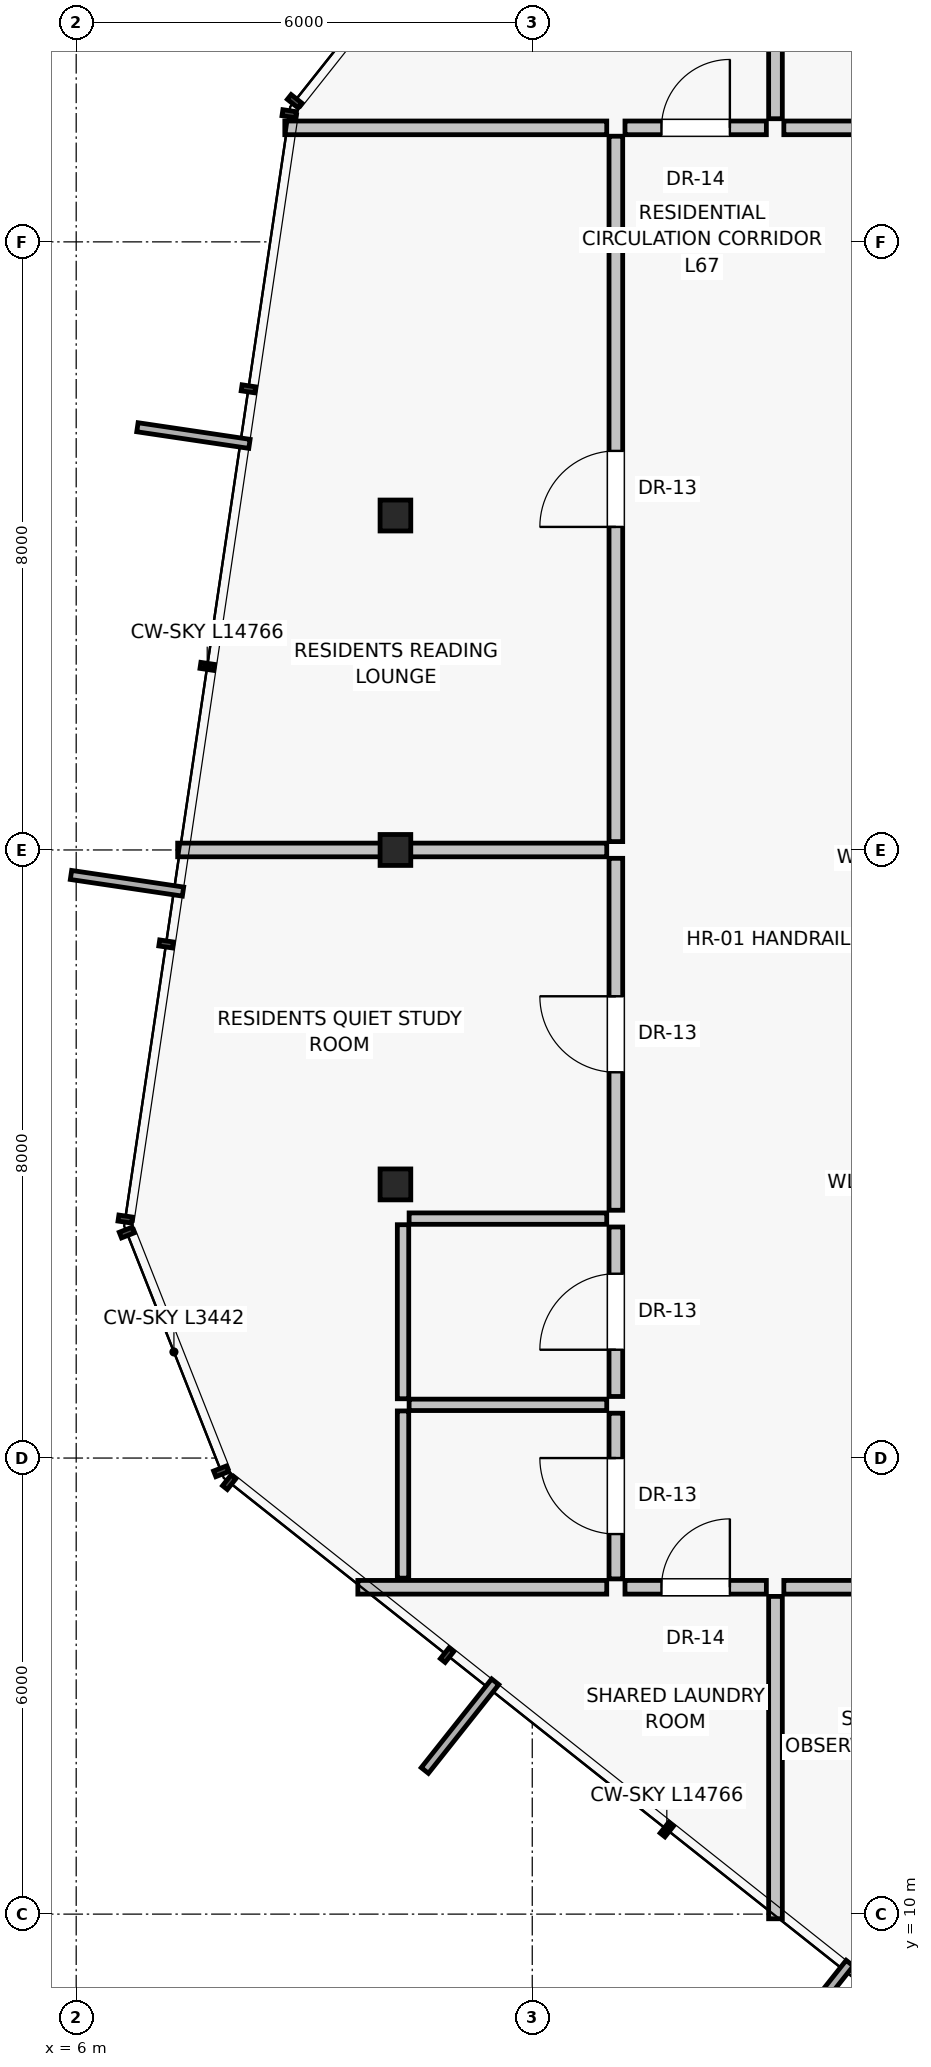
"""IFC4 building model, lengths in metres.
Left out: names, types, materials, properties, quantities, classifications, styles, units other than length and angle.
Written with IfcOpenShell. Run it as: python <this file> out.ifc"""

import sys

from ifc_helpers import new_model, si_unit, direction, frame, frame_2d, origin, origin_2d, place, context, subcontext, project, spatial, rectangle, i_section, extrude, source, transform, mapped, element, fill, save


model = new_model("IFC4")
c1 = context("Model", 3, precision=1e-05, world=origin(), true_north=direction((0.0, 1.0)))
c2 = subcontext(c1, "Body", "Model", "MODEL_VIEW")
j1 = project(units=[si_unit("LENGTHUNIT", "METRE"), si_unit("PLANEANGLEUNIT", "RADIAN")], contexts=[c1])
p1 = place(None, origin())
s1 = spatial("IfcSite", under=j1, at=p1, CompositionType="ELEMENT")
p2 = place(p1, origin())
s2 = spatial("IfcBuilding", under=s1, at=p2, CompositionType="ELEMENT")
p3 = place(p2, frame((0.0, 0.0, 236.55)))
s3 = spatial("IfcBuildingStorey", under=s2, at=p3, CompositionType="ELEMENT", Elevation=236.55)
for number, where, z_axis, x_axis in (
    (1, (10.2, 28.4, 0.0), (0.0, 0.0, 1.0), (1.0, 0.0, 0.0)),
    (2, (10.2, 24.0, 0.0), (0.0, 0.0, 1.0), (1.0, 0.0, 0.0)),
    (3, (10.2, 19.6, 0.0), (0.0, 0.0, 1.0), (1.0, 0.0, 0.0)),
):
    element("IfcColumn", number, at=place(p3, frame(where, z_axis=z_axis, x_axis=x_axis)), inside=s3, PredefinedType="COLUMN", context=c2, shape_type="SweptSolid", body=[
        extrude(i_section(OverallWidth=0.404, OverallDepth=0.407, WebThickness=0.025, FlangeThickness=0.04, at=origin_2d()), origin(), (0.0, 0.0, 1.0), 4.1),
    ])
p4 = place(p3, frame((15.2, 14.18, 0.0), z_axis=(0.0, 0.0, 1.0), x_axis=(0.0, -1.0, 0.0)))
e4 = element("IfcWall", 4, at=p4, inside=s3, PredefinedType="PARTITIONING", context=c2, shape_type="SweptSolid", body=[
    extrude(rectangle(XDim=4.241, YDim=0.18, at=frame_2d((2.121, 0.0))), origin(), (0.0, 0.0, 1.0), 3.865),
])
p5 = place(p3, frame((15.31, 14.3, 0.0), z_axis=(0.0, 0.0, 1.0), x_axis=(1.0, 0.0, 0.0)))
e5 = element("IfcWall", 5, at=p5, inside=s3, PredefinedType="PARTITIONING", context=c2, shape_type="SweptSolid", body=[
    extrude(rectangle(XDim=8.9, YDim=0.18, at=frame_2d((4.45, 0.0))), origin(), (0.0, 0.0, 1.0), 3.865),
])
p6 = place(p5, frame((3.55, 0.0, 0.0)))
e6 = element("IfcOpeningElement", 6, at=p6, cuts=e5, PredefinedType="OPENING", context=c2, shape_type="SweptSolid", body=[
    extrude(rectangle(XDim=1.8, YDim=2.25, at=frame_2d((0.9, 1.125))), frame((0.0, 0.1, 0.0), z_axis=(0.0, -1.0, 0.0), x_axis=(1.0, 0.0, 0.0)), (0.0, 0.0, 1.0), 0.2),
])
p7 = place(p3, frame((15.2, 33.62, 0.0), z_axis=(0.0, 0.0, 1.0), x_axis=(0.0, 1.0, 0.0)))
e7 = element("IfcWall", 7, at=p7, inside=s3, PredefinedType="PARTITIONING", context=c2, shape_type="SweptSolid", body=[
    extrude(rectangle(XDim=4.627, YDim=0.18, at=frame_2d((2.314, 0.0))), origin(), (0.0, 0.0, 1.0), 3.865),
])
p8 = place(p3, frame((15.31, 33.5, 0.0), z_axis=(0.0, 0.0, 1.0), x_axis=(1.0, 0.0, 0.0)))
e8 = element("IfcWall", 8, at=p8, inside=s3, PredefinedType="PARTITIONING", context=c2, shape_type="SweptSolid", body=[
    extrude(rectangle(XDim=5.95, YDim=0.18, at=frame_2d((2.975, 0.0))), origin(), (0.0, 0.0, 1.0), 3.865),
])
p9 = place(p8, frame((3.604, 0.0, 0.0)))
e9 = element("IfcOpeningElement", 9, at=p9, cuts=e8, PredefinedType="OPENING", context=c2, shape_type="SweptSolid", body=[
    extrude(rectangle(XDim=0.95, YDim=2.02, at=frame_2d((0.475, 1.01))), frame((0.0, 0.1, 0.0), z_axis=(0.0, -1.0, 0.0), x_axis=(1.0, 0.0, 0.0)), (0.0, 0.0, 1.0), 0.2),
])
p10 = place(p3, frame((12.98, 14.3, 0.0), z_axis=(0.0, 0.0, 1.0), x_axis=(-1.0, 0.0, 0.0)))
e10 = element("IfcWall", 10, at=p10, inside=s3, PredefinedType="PARTITIONING", context=c2, shape_type="SweptSolid", body=[
    extrude(rectangle(XDim=3.274, YDim=0.18, at=frame_2d((1.637, 0.0))), origin(), (0.0, 0.0, 1.0), 3.865),
])
p11 = place(p3, frame((12.98, 33.5, 0.0), z_axis=(0.0, 0.0, 1.0), x_axis=(-1.0, 0.0, 0.0)))
e11 = element("IfcWall", 11, at=p11, inside=s3, PredefinedType="PARTITIONING", context=c2, shape_type="SweptSolid", body=[
    extrude(rectangle(XDim=4.235, YDim=0.18, at=frame_2d((2.118, 0.0))), origin(), (0.0, 0.0, 1.0), 3.865),
])
p12 = place(p3, frame((13.1, 14.41, 0.0), z_axis=(0.0, 0.0, 1.0), x_axis=(0.0, 1.0, 0.0)))
e12 = element("IfcWall", 12, at=p12, inside=s3, PredefinedType="PARTITIONING", context=c2, shape_type="SweptSolid", body=[
    extrude(rectangle(XDim=2.18, YDim=0.18, at=frame_2d((1.09, 0.0))), origin(), (0.0, 0.0, 1.0), 3.865),
])
p13 = place(p12, frame((0.59, 0.0, 0.0)))
e13 = element("IfcOpeningElement", 13, at=p13, cuts=e12, PredefinedType="OPENING", context=c2, shape_type="SweptSolid", body=[
    extrude(rectangle(XDim=1.0, YDim=2.01, at=frame_2d((0.5, 1.005))), frame((0.0, 0.1, 0.0), z_axis=(0.0, -1.0, 0.0), x_axis=(1.0, 0.0, 0.0)), (0.0, 0.0, 1.0), 0.2),
])
p14 = place(p3, frame((13.1, 16.81, 0.0), z_axis=(0.0, 0.0, 1.0), x_axis=(0.0, 1.0, 0.0)))
e14 = element("IfcWall", 14, at=p14, inside=s3, PredefinedType="PARTITIONING", context=c2, shape_type="SweptSolid", body=[
    extrude(rectangle(XDim=2.23, YDim=0.18, at=frame_2d((1.115, 0.0))), origin(), (0.0, 0.0, 1.0), 3.512),
])
p15 = place(p14, frame((0.615, 0.0, 0.0)))
e15 = element("IfcOpeningElement", 15, at=p15, cuts=e14, PredefinedType="OPENING", context=c2, shape_type="SweptSolid", body=[
    extrude(rectangle(XDim=1.0, YDim=2.01, at=frame_2d((0.5, 1.005))), frame((0.0, 0.1, 0.0), z_axis=(0.0, -1.0, 0.0), x_axis=(1.0, 0.0, 0.0)), (0.0, 0.0, 1.0), 0.2),
])
p16 = place(p3, frame((13.1, 19.26, 0.0), z_axis=(0.0, 0.0, 1.0), x_axis=(0.0, 1.0, 0.0)))
e16 = element("IfcWall", 16, at=p16, inside=s3, PredefinedType="PARTITIONING", context=c2, shape_type="SweptSolid", body=[
    extrude(rectangle(XDim=4.63, YDim=0.18, at=frame_2d((2.315, 0.0))), origin(), (0.0, 0.0, 1.0), 3.512),
])
p17 = place(p16, frame((1.815, 0.0, 0.0)))
e17 = element("IfcOpeningElement", 17, at=p17, cuts=e16, PredefinedType="OPENING", context=c2, shape_type="SweptSolid", body=[
    extrude(rectangle(XDim=1.0, YDim=2.01, at=frame_2d((0.5, 1.005))), frame((0.0, 0.1, 0.0), z_axis=(0.0, -1.0, 0.0), x_axis=(1.0, 0.0, 0.0)), (0.0, 0.0, 1.0), 0.2),
])
p18 = place(p3, frame((13.1, 24.11, 0.0), z_axis=(0.0, 0.0, 1.0), x_axis=(0.0, 1.0, 0.0)))
e18 = element("IfcWall", 18, at=p18, inside=s3, PredefinedType="PARTITIONING", context=c2, shape_type="SweptSolid", body=[
    extrude(rectangle(XDim=9.28, YDim=0.18, at=frame_2d((4.64, 0.0))), origin(), (0.0, 0.0, 1.0), 3.512),
])
p19 = place(p18, frame((4.14, 0.0, 0.0)))
e19 = element("IfcOpeningElement", 19, at=p19, cuts=e18, PredefinedType="OPENING", context=c2, shape_type="SweptSolid", body=[
    extrude(rectangle(XDim=1.0, YDim=2.01, at=frame_2d((0.5, 1.005))), frame((0.0, 0.1, 0.0), z_axis=(0.0, -1.0, 0.0), x_axis=(1.0, 0.0, 0.0)), (0.0, 0.0, 1.0), 0.2),
])
for number, where, z_axis, x_axis in (
    (20, (12.98, 16.7, 0.0), (0.0, 0.0, 1.0), (-1.0, 0.0, 0.0)),
    (21, (12.98, 19.15, 0.0), (0.0, 0.0, 1.0), (-1.0, 0.0, 0.0)),
):
    element("IfcWall", number, at=place(p3, frame(where, z_axis=z_axis, x_axis=x_axis)), inside=s3, PredefinedType="PARTITIONING", context=c2, shape_type="SweptSolid", body=[
        extrude(rectangle(XDim=2.6, YDim=0.15, at=frame_2d((1.3, 0.0))), origin(), (0.0, 0.0, 1.0), 3.865),
    ])
p20 = place(p3, frame((10.3, 14.42, 0.0), z_axis=(0.0, 0.0, 1.0), x_axis=(0.0, 1.0, 0.0)))
e22 = element("IfcWall", 22, at=p20, inside=s3, PredefinedType="PARTITIONING", context=c2, shape_type="SweptSolid", body=[
    extrude(rectangle(XDim=2.2, YDim=0.15, at=frame_2d((1.1, 0.0))), origin(), (0.0, 0.0, 1.0), 3.865),
])
p21 = place(p3, frame((10.3, 16.78, 0.0), z_axis=(0.0, 0.0, 1.0), x_axis=(0.0, 1.0, 0.0)))
e23 = element("IfcWall", 23, at=p21, inside=s3, PredefinedType="PARTITIONING", context=c2, shape_type="SweptSolid", body=[
    extrude(rectangle(XDim=2.29, YDim=0.15, at=frame_2d((1.145, 0.0))), origin(), (0.0, 0.0, 1.0), 3.865),
])
p22 = place(p3, frame((12.98, 24.0, 0.0), z_axis=(0.0, 0.0, 1.0), x_axis=(-1.0, 0.0, 0.0)))
e24 = element("IfcWall", 24, at=p22, inside=s3, PredefinedType="PARTITIONING", context=c2, shape_type="SweptSolid", body=[
    extrude(rectangle(XDim=5.645, YDim=0.18, at=frame_2d((2.822, 0.0))), origin(), (0.0, 0.0, 1.0), 3.865),
])
p23 = place(p3, frame((13.22, 14.3, 0.0), z_axis=(0.0, 0.0, 1.0), x_axis=(1.0, 0.0, 0.0)))
e25 = element("IfcWall", 25, at=p23, inside=s3, PredefinedType="PARTITIONING", context=c2, shape_type="SweptSolid", body=[
    extrude(rectangle(XDim=1.86, YDim=0.18, at=frame_2d((0.93, 0.0))), origin(), (0.0, 0.0, 1.0), 3.865),
])
p24 = place(p23, frame((0.48, 0.0, 0.0)))
e26 = element("IfcOpeningElement", 26, at=p24, cuts=e25, PredefinedType="OPENING", context=c2, shape_type="SweptSolid", body=[
    extrude(rectangle(XDim=0.9, YDim=2.01, at=frame_2d((0.45, 1.005))), frame((0.0, 0.1, 0.0), z_axis=(0.0, -1.0, 0.0), x_axis=(1.0, 0.0, 0.0)), (0.0, 0.0, 1.0), 0.2),
])
p25 = place(p3, frame((13.22, 33.5, 0.0), z_axis=(0.0, 0.0, 1.0), x_axis=(1.0, 0.0, 0.0)))
e27 = element("IfcWall", 27, at=p25, inside=s3, PredefinedType="PARTITIONING", context=c2, shape_type="SweptSolid", body=[
    extrude(rectangle(XDim=1.86, YDim=0.18, at=frame_2d((0.93, 0.0))), origin(), (0.0, 0.0, 1.0), 3.865),
])
p26 = place(p25, frame((0.48, 0.0, 0.0)))
e28 = element("IfcOpeningElement", 28, at=p26, cuts=e27, PredefinedType="OPENING", context=c2, shape_type="SweptSolid", body=[
    extrude(rectangle(XDim=0.9, YDim=2.01, at=frame_2d((0.45, 1.005))), frame((0.0, 0.1, 0.0), z_axis=(0.0, -1.0, 0.0), x_axis=(1.0, 0.0, 0.0)), (0.0, 0.0, 1.0), 0.2),
])
m1 = source(origin(), c2, "Body", "SweptSolid", [
    extrude(rectangle(XDim=1.0, YDim=2.01, at=frame_2d((0.5, 1.005))), frame((0.0, 0.025, 0.0), z_axis=(0.0, -1.0, 0.0), x_axis=(1.0, 0.0, 0.0)), (0.0, 0.0, 1.0), 0.05),
])
p27 = place(p13, origin())
e29 = element("IfcDoor", 29, at=p27, inside=s3, OperationType="SINGLE_SWING_RIGHT", PredefinedType="DOOR", context=c2, shape_type="MappedRepresentation", body=[
    mapped(m1, transform((0.0, 0.0, 0.0), scale=1.0)),
])
fill(e13, e29)
p28 = place(p15, origin())
e30 = element("IfcDoor", 30, at=p28, inside=s3, OperationType="SINGLE_SWING_LEFT", PredefinedType="DOOR", context=c2, shape_type="MappedRepresentation", body=[
    mapped(m1, transform((0.0, 0.0, 0.0), scale=1.0)),
])
fill(e15, e30)
p29 = place(p17, origin())
e31 = element("IfcDoor", 31, at=p29, inside=s3, OperationType="SINGLE_SWING_RIGHT", PredefinedType="DOOR", context=c2, shape_type="MappedRepresentation", body=[
    mapped(m1, transform((0.0, 0.0, 0.0), scale=1.0)),
])
fill(e17, e31)
p30 = place(p19, origin())
e32 = element("IfcDoor", 32, at=p30, inside=s3, OperationType="SINGLE_SWING_LEFT", PredefinedType="DOOR", context=c2, shape_type="MappedRepresentation", body=[
    mapped(m1, transform((0.0, 0.0, 0.0), scale=1.0)),
])
fill(e19, e32)
m2 = source(origin(), c2, "Body", "SweptSolid", [
    extrude(rectangle(XDim=0.9, YDim=2.01, at=frame_2d((0.45, 1.005))), frame((0.0, 0.025, 0.0), z_axis=(0.0, -1.0, 0.0), x_axis=(1.0, 0.0, 0.0)), (0.0, 0.0, 1.0), 0.05),
])
p31 = place(p24, origin())
e33 = element("IfcDoor", 33, at=p31, inside=s3, OperationType="SINGLE_SWING_RIGHT", PredefinedType="DOOR", context=c2, shape_type="MappedRepresentation", body=[
    mapped(m2, transform((0.0, 0.0, 0.0), scale=1.0)),
])
fill(e26, e33)
p32 = place(p26, origin())
e34 = element("IfcDoor", 34, at=p32, inside=s3, OperationType="SINGLE_SWING_RIGHT", PredefinedType="DOOR", context=c2, shape_type="MappedRepresentation", body=[
    mapped(m2, transform((0.0, 0.0, 0.0), scale=1.0)),
])
fill(e28, e34)
save(model, sys.argv[1])
